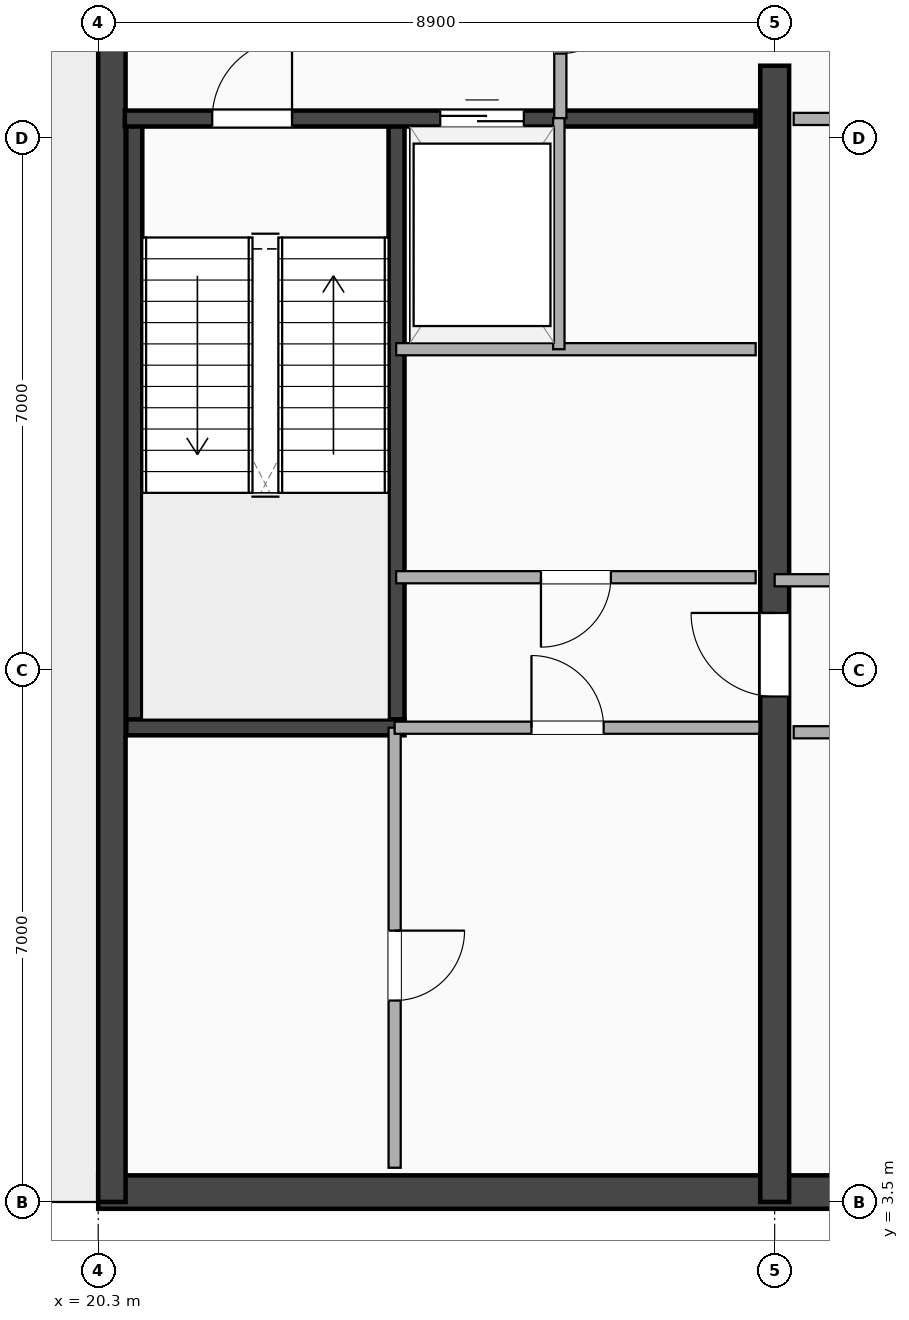
"""IFC4 building model, lengths in metres.
Left out: names, types, materials, properties, quantities, classifications, styles, units other than length and angle.
Written with IfcOpenShell. Run it as: python <this file> out.ifc"""

import sys

from ifc_helpers import new_model, si_unit, direction, frame, frame_2d, origin, place, context, subcontext, project, spatial, rectangle, extrude, element, fill, save


model = new_model("IFC4")
c1 = context("Model", 3, precision=1e-05, world=origin(), true_north=direction((0.0, 1.0)))
c2 = subcontext(c1, "Body", "Model", "MODEL_VIEW")
j1 = project(units=[si_unit("LENGTHUNIT", "METRE"), si_unit("PLANEANGLEUNIT", "RADIAN")], contexts=[c1])
p1 = place(None, origin())
s1 = spatial("IfcSite", under=j1, at=p1, CompositionType="ELEMENT")
p2 = place(p1, origin())
s2 = spatial("IfcBuilding", under=s1, at=p2, CompositionType="ELEMENT")
p3 = place(p2, frame((0.0, 0.0, 307.9)))
s3 = spatial("IfcBuildingStorey", under=s2, at=p3, CompositionType="ELEMENT", Elevation=307.9)
p4 = place(p3, frame((20.3, 3.63, 0.0), z_axis=(0.0, 0.0, 1.0), x_axis=(1.0, 0.0, 0.0)))
e1 = element("IfcWall", 1, at=p4, inside=s3, PredefinedType="SHEAR", context=c2, shape_type="SweptSolid", body=[
    extrude(rectangle(XDim=24.5, YDim=0.44, at=frame_2d((12.25, 0.0))), origin(), (0.0, 0.0, 1.0), 4.3),
])
p5 = place(p3, frame((20.48, 3.5, 0.0), z_axis=(0.0, 0.0, 1.0), x_axis=(0.0, 1.0, 0.0)))
e2 = element("IfcWall", 2, at=p5, inside=s3, PredefinedType="SHEAR", context=c2, shape_type="SweptSolid", body=[
    extrude(rectangle(XDim=22.3, YDim=0.36, at=frame_2d((11.15, 0.0))), origin(), (0.0, 0.0, 1.0), 4.3),
])
p6 = place(p3, frame((29.2, 3.5, 0.0), z_axis=(0.0, 0.0, 1.0), x_axis=(0.0, 1.0, 0.0)))
e3 = element("IfcWall", 3, at=p6, inside=s3, PredefinedType="SHEAR", context=c2, shape_type="SweptSolid", body=[
    extrude(rectangle(XDim=14.95, YDim=0.38, at=frame_2d((7.475, 0.0))), origin(), (0.0, 0.0, 1.0), 4.3),
])
p7 = place(p6, frame((7.75, 0.0, 0.0), z_axis=(0.0, 0.0, 1.0), x_axis=(-1.0, 0.0, 0.0)))
e4 = element("IfcOpeningElement", 4, at=p7, cuts=e3, PredefinedType="OPENING", context=c2, shape_type="SweptSolid", body=[
    extrude(rectangle(XDim=1.1, YDim=2.15, at=frame_2d((0.55, 1.075))), frame((0.0, 0.2, 0.0), z_axis=(0.0, -1.0, 0.0), x_axis=(1.0, 0.0, 0.0)), (0.0, 0.0, 1.0), 0.4),
])
for number, where, z_axis, x_axis in (
    (5, (20.775, 9.745, 0.0), (0.0, 0.0, 1.0), (0.0, 1.0, 0.0)),
    (6, (24.225, 9.745, 0.0), (0.0, 0.0, 1.0), (0.0, 1.0, 0.0)),
):
    element("IfcWall", number, at=place(p3, frame(where, z_axis=z_axis, x_axis=x_axis)), inside=s3, PredefinedType="SHEAR", context=c2, shape_type="SweptSolid", body=[
        extrude(rectangle(XDim=8.01, YDim=0.21, at=frame_2d((4.005, 0.0))), origin(), (0.0, 0.0, 1.0), 4.3),
    ])
p8 = place(p3, frame((20.67, 9.745, 0.0), z_axis=(0.0, 0.0, 1.0), x_axis=(1.0, 0.0, 0.0)))
e7 = element("IfcWall", 7, at=p8, inside=s3, PredefinedType="SHEAR", context=c2, shape_type="SweptSolid", body=[
    extrude(rectangle(XDim=3.66, YDim=0.21, at=frame_2d((1.83, 0.0))), origin(), (0.0, 0.0, 1.0), 4.3),
])
p9 = place(p3, frame((20.65, 17.755, 0.0), z_axis=(0.0, 0.0, 1.0), x_axis=(1.0, 0.0, 0.0)))
e8 = element("IfcWall", 8, at=p9, inside=s3, PredefinedType="SHEAR", context=c2, shape_type="SweptSolid", body=[
    extrude(rectangle(XDim=8.3, YDim=0.21, at=frame_2d((4.15, 0.0))), origin(), (0.0, 0.0, 1.0), 4.3),
])
p10 = place(p9, frame((2.2, 0.0, 0.0), z_axis=(0.0, 0.0, 1.0), x_axis=(-1.0, 0.0, 0.0)))
e9 = element("IfcOpeningElement", 9, at=p10, cuts=e8, PredefinedType="OPENING", context=c2, shape_type="SweptSolid", body=[
    extrude(rectangle(XDim=1.05, YDim=2.15, at=frame_2d((0.525, 1.075))), frame((0.0, 0.115, 0.0), z_axis=(0.0, -1.0, 0.0), x_axis=(1.0, 0.0, 0.0)), (0.0, 0.0, 1.0), 0.23),
])
p11 = place(p9, frame((4.15, 0.0, 0.0)))
e10 = element("IfcOpeningElement", 10, at=p11, cuts=e8, PredefinedType="OPENING", context=c2, shape_type="SweptSolid", body=[
    extrude(rectangle(XDim=1.1, YDim=2.18, at=frame_2d((0.55, 1.09))), frame((0.0, 0.115, 0.0), z_axis=(0.0, -1.0, 0.0), x_axis=(1.0, 0.0, 0.0)), (0.0, 0.0, 1.0), 0.23),
])
p12 = place(p3, frame((26.38, 17.76, 0.0), z_axis=(0.0, 0.0, 1.0), x_axis=(0.0, 1.0, 0.0)))
e11 = element("IfcWall", 11, at=p12, inside=s3, PredefinedType="PARTITIONING", context=c2, shape_type="SweptSolid", body=[
    extrude(rectangle(XDim=2.66, YDim=0.16, at=frame_2d((1.33, 0.0))), origin(), (0.0, 0.0, 1.0), 4.3),
])
p13 = place(p12, frame((0.85, 0.0, 0.0)))
e12 = element("IfcOpeningElement", 12, at=p13, cuts=e11, PredefinedType="OPENING", context=c2, shape_type="SweptSolid", body=[
    extrude(rectangle(XDim=0.88, YDim=2.08, at=frame_2d((0.44, 1.04))), frame((0.0, 0.09, 0.0), z_axis=(0.0, -1.0, 0.0), x_axis=(1.0, 0.0, 0.0)), (0.0, 0.0, 1.0), 0.18),
])
p14 = place(p3, frame((24.22, 14.72, 0.0), z_axis=(0.0, 0.0, 1.0), x_axis=(1.0, 0.0, 0.0)))
e13 = element("IfcWall", 13, at=p14, inside=s3, PredefinedType="PARTITIONING", context=c2, shape_type="SweptSolid", body=[
    extrude(rectangle(XDim=4.73, YDim=0.16, at=frame_2d((2.365, 0.0))), origin(), (0.0, 0.0, 1.0), 4.3),
])
p15 = place(p3, frame((26.36, 14.72, 0.0), z_axis=(0.0, 0.0, 1.0), x_axis=(0.0, 1.0, 0.0)))
e14 = element("IfcWall", 14, at=p15, inside=s3, PredefinedType="PARTITIONING", context=c2, shape_type="SweptSolid", body=[
    extrude(rectangle(XDim=3.04, YDim=0.15, at=frame_2d((1.52, 0.0))), origin(), (0.0, 0.0, 1.0), 4.3),
])
p16 = place(p3, frame((24.22, 11.72, 0.0), z_axis=(0.0, 0.0, 1.0), x_axis=(1.0, 0.0, 0.0)))
e15 = element("IfcWall", 15, at=p16, inside=s3, PredefinedType="PARTITIONING", context=c2, shape_type="SweptSolid", body=[
    extrude(rectangle(XDim=4.73, YDim=0.16, at=frame_2d((2.365, 0.0))), origin(), (0.0, 0.0, 1.0), 4.3),
])
p17 = place(p16, frame((1.905, 0.0, 0.0)))
e16 = element("IfcOpeningElement", 16, at=p17, cuts=e15, PredefinedType="OPENING", context=c2, shape_type="SweptSolid", body=[
    extrude(rectangle(XDim=0.92, YDim=2.08, at=frame_2d((0.46, 1.04))), frame((0.0, 0.09, 0.0), z_axis=(0.0, -1.0, 0.0), x_axis=(1.0, 0.0, 0.0)), (0.0, 0.0, 1.0), 0.18),
])
p18 = place(p3, frame((24.2, 3.95, 0.0), z_axis=(0.0, 0.0, 1.0), x_axis=(0.0, 1.0, 0.0)))
e17 = element("IfcWall", 17, at=p18, inside=s3, PredefinedType="PARTITIONING", context=c2, shape_type="SweptSolid", body=[
    extrude(rectangle(XDim=5.79, YDim=0.16, at=frame_2d((2.895, 0.0))), origin(), (0.0, 0.0, 1.0), 4.3),
])
p19 = place(p18, frame((2.2, 0.0, 0.0)))
e18 = element("IfcOpeningElement", 18, at=p19, cuts=e17, PredefinedType="OPENING", context=c2, shape_type="SweptSolid", body=[
    extrude(rectangle(XDim=0.92, YDim=2.08, at=frame_2d((0.46, 1.04))), frame((0.0, 0.09, 0.0), z_axis=(0.0, -1.0, 0.0), x_axis=(1.0, 0.0, 0.0)), (0.0, 0.0, 1.0), 0.18),
])
p20 = place(p3, frame((24.2, 9.74, 0.0), z_axis=(0.0, 0.0, 1.0), x_axis=(1.0, 0.0, 0.0)))
e19 = element("IfcWall", 19, at=p20, inside=s3, PredefinedType="PARTITIONING", context=c2, shape_type="SweptSolid", body=[
    extrude(rectangle(XDim=4.8, YDim=0.16, at=frame_2d((2.4, 0.0))), origin(), (0.0, 0.0, 1.0), 4.3),
])
p21 = place(p20, frame((2.75, 0.0, 0.0), z_axis=(0.0, 0.0, 1.0), x_axis=(-1.0, 0.0, 0.0)))
e20 = element("IfcOpeningElement", 20, at=p21, cuts=e19, PredefinedType="OPENING", context=c2, shape_type="SweptSolid", body=[
    extrude(rectangle(XDim=0.95, YDim=2.15, at=frame_2d((0.475, 1.075))), frame((0.0, 0.09, 0.0), z_axis=(0.0, -1.0, 0.0), x_axis=(1.0, 0.0, 0.0)), (0.0, 0.0, 1.0), 0.18),
])
p22 = place(p3, frame((29.45, 9.68, 0.0), z_axis=(0.0, 0.0, 1.0), x_axis=(1.0, 0.0, 0.0)))
e21 = element("IfcWall", 21, at=p22, inside=s3, PredefinedType="PARTITIONING", context=c2, shape_type="SweptSolid", body=[
    extrude(rectangle(XDim=7.3, YDim=0.16, at=frame_2d((3.65, 0.0))), origin(), (0.0, 0.0, 1.0), 4.3),
])
p23 = place(p22, frame((4.11, 0.0, 0.0), z_axis=(0.0, 0.0, 1.0), x_axis=(-1.0, 0.0, 0.0)))
e22 = element("IfcOpeningElement", 22, at=p23, cuts=e21, PredefinedType="OPENING", context=c2, shape_type="SweptSolid", body=[
    extrude(rectangle(XDim=0.92, YDim=2.08, at=frame_2d((0.46, 1.04))), frame((0.0, 0.09, 0.0), z_axis=(0.0, -1.0, 0.0), x_axis=(1.0, 0.0, 0.0)), (0.0, 0.0, 1.0), 0.18),
])
p24 = place(p3, frame((29.2, 11.68, 0.0), z_axis=(0.0, 0.0, 1.0), x_axis=(1.0, 0.0, 0.0)))
e23 = element("IfcWall", 23, at=p24, inside=s3, PredefinedType="PARTITIONING", context=c2, shape_type="SweptSolid", body=[
    extrude(rectangle(XDim=5.72, YDim=0.16, at=frame_2d((2.86, 0.0))), origin(), (0.0, 0.0, 1.0), 4.3),
])
p25 = place(p3, frame((29.45, 17.75, 0.0), z_axis=(0.0, 0.0, 1.0), x_axis=(1.0, 0.0, 0.0)))
e24 = element("IfcWall", 24, at=p25, inside=s3, PredefinedType="PARTITIONING", context=c2, shape_type="SweptSolid", body=[
    extrude(rectangle(XDim=5.43, YDim=0.16, at=frame_2d((2.715, 0.0))), origin(), (0.0, 0.0, 1.0), 4.3),
])
p26 = place(p25, frame((3.175, 0.0, 0.0), z_axis=(0.0, 0.0, 1.0), x_axis=(-1.0, 0.0, 0.0)))
e25 = element("IfcOpeningElement", 25, at=p26, cuts=e24, PredefinedType="OPENING", context=c2, shape_type="SweptSolid", body=[
    extrude(rectangle(XDim=0.92, YDim=2.08, at=frame_2d((0.46, 1.04))), frame((0.0, 0.09, 0.0), z_axis=(0.0, -1.0, 0.0), x_axis=(1.0, 0.0, 0.0)), (0.0, 0.0, 1.0), 0.18),
])
p27 = place(p10, origin())
e26 = element("IfcDoor", 26, at=p27, inside=s3, OperationType="SINGLE_SWING_RIGHT", PredefinedType="DOOR", context=c2, shape_type="SweptSolid", body=[
    extrude(rectangle(XDim=1.05, YDim=2.15, at=frame_2d((0.525, 1.075))), frame((0.0, 0.025, 0.0), z_axis=(0.0, -1.0, 0.0), x_axis=(1.0, 0.0, 0.0)), (0.0, 0.0, 1.0), 0.05),
])
fill(e9, e26)
p28 = place(p11, origin())
e27 = element("IfcDoor", 27, at=p28, inside=s3, OperationType="DOUBLE_DOOR_SLIDING", PredefinedType="DOOR", context=c2, shape_type="SweptSolid", body=[
    extrude(rectangle(XDim=1.1, YDim=2.18, at=frame_2d((0.55, 1.09))), frame((0.0, 0.025, 0.0), z_axis=(0.0, -1.0, 0.0), x_axis=(1.0, 0.0, 0.0)), (0.0, 0.0, 1.0), 0.05),
])
fill(e10, e27)
p29 = place(p7, origin())
e28 = element("IfcDoor", 28, at=p29, inside=s3, OperationType="SINGLE_SWING_RIGHT", PredefinedType="DOOR", context=c2, shape_type="SweptSolid", body=[
    extrude(rectangle(XDim=1.1, YDim=2.15, at=frame_2d((0.55, 1.075))), frame((0.0, 0.025, 0.0), z_axis=(0.0, -1.0, 0.0), x_axis=(1.0, 0.0, 0.0)), (0.0, 0.0, 1.0), 0.05),
])
fill(e4, e28)
p30 = place(p13, origin())
e29 = element("IfcDoor", 29, at=p30, inside=s3, OperationType="SINGLE_SWING_RIGHT", PredefinedType="DOOR", context=c2, shape_type="SweptSolid", body=[
    extrude(rectangle(XDim=0.88, YDim=2.08, at=frame_2d((0.44, 1.04))), frame((0.0, 0.025, 0.0), z_axis=(0.0, -1.0, 0.0), x_axis=(1.0, 0.0, 0.0)), (0.0, 0.0, 1.0), 0.05),
])
fill(e12, e29)
p31 = place(p17, origin())
e30 = element("IfcDoor", 30, at=p31, inside=s3, OperationType="SINGLE_SWING_LEFT", PredefinedType="DOOR", context=c2, shape_type="SweptSolid", body=[
    extrude(rectangle(XDim=0.92, YDim=2.08, at=frame_2d((0.46, 1.04))), frame((0.0, 0.025, 0.0), z_axis=(0.0, -1.0, 0.0), x_axis=(1.0, 0.0, 0.0)), (0.0, 0.0, 1.0), 0.05),
])
fill(e16, e30)
p32 = place(p19, origin())
e31 = element("IfcDoor", 31, at=p32, inside=s3, OperationType="SINGLE_SWING_RIGHT", PredefinedType="DOOR", context=c2, shape_type="SweptSolid", body=[
    extrude(rectangle(XDim=0.92, YDim=2.08, at=frame_2d((0.46, 1.04))), frame((0.0, 0.025, 0.0), z_axis=(0.0, -1.0, 0.0), x_axis=(1.0, 0.0, 0.0)), (0.0, 0.0, 1.0), 0.05),
])
fill(e18, e31)
p33 = place(p21, origin())
e32 = element("IfcDoor", 32, at=p33, inside=s3, OperationType="SINGLE_SWING_LEFT", PredefinedType="DOOR", context=c2, shape_type="SweptSolid", body=[
    extrude(rectangle(XDim=0.95, YDim=2.15, at=frame_2d((0.475, 1.075))), frame((0.0, 0.025, 0.0), z_axis=(0.0, -1.0, 0.0), x_axis=(1.0, 0.0, 0.0)), (0.0, 0.0, 1.0), 0.05),
])
fill(e20, e32)
save(model, sys.argv[1])
